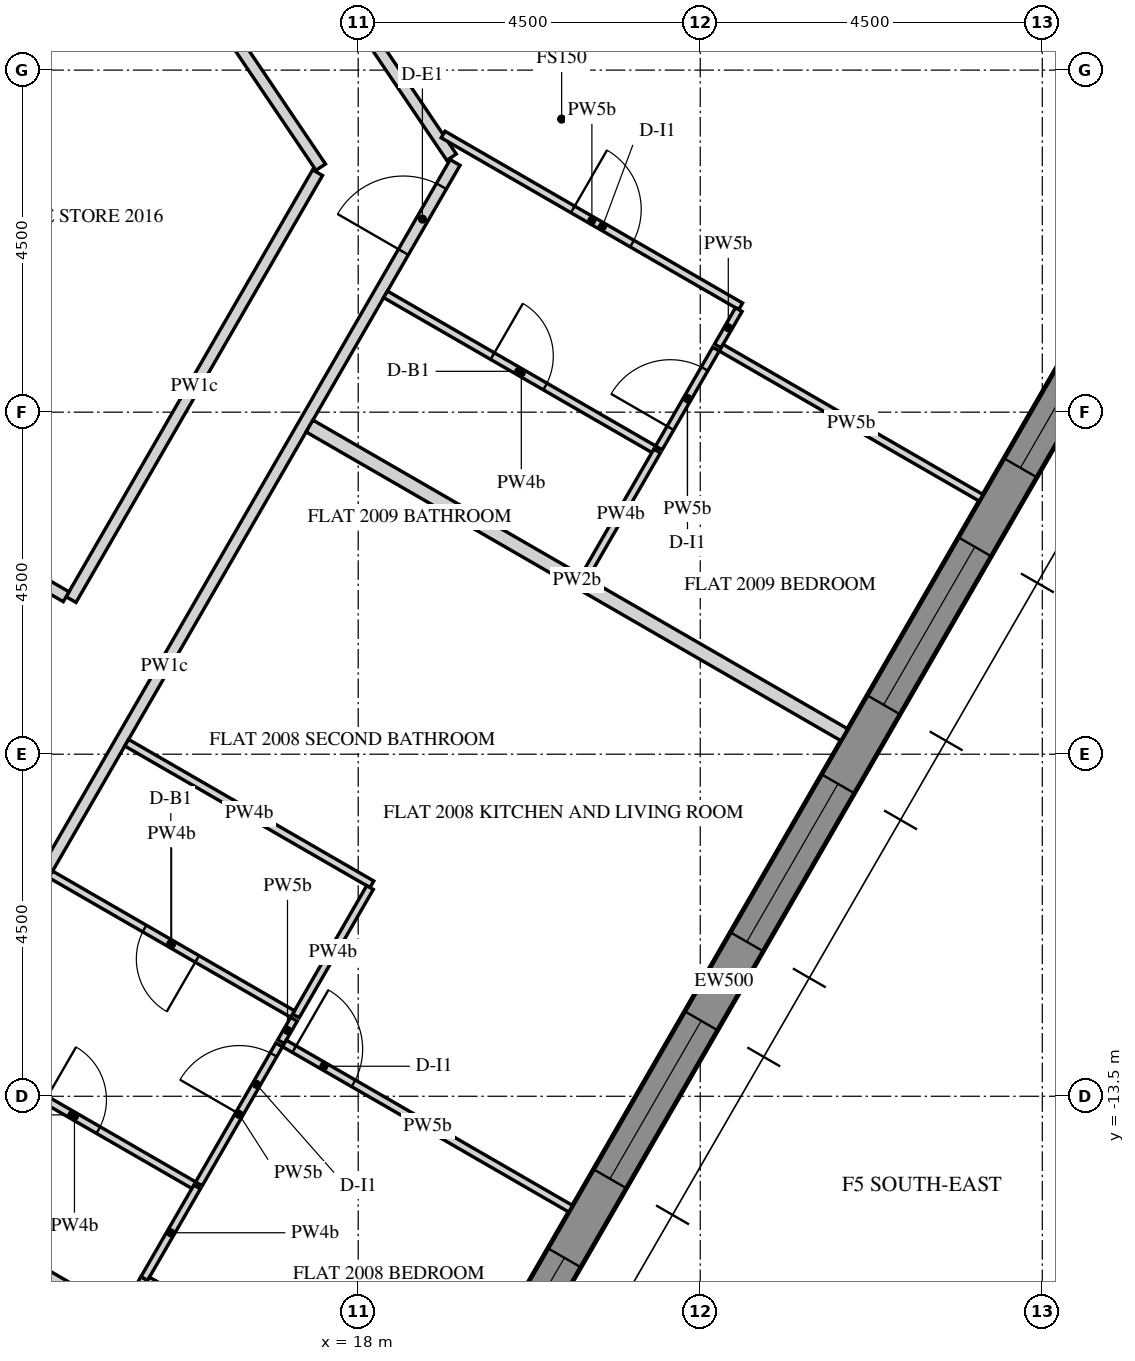
"""IFC4 building model, lengths in metres.
Left out: names, types, materials, properties, quantities, classifications, styles, units other than length and angle.
Written with IfcOpenShell. Run it as: python <this file> out.ifc"""

import sys

from ifc_helpers import new_model, si_unit, direction, frame, frame_2d, origin, place, context, subcontext, project, spatial, polyline, rectangle, outline, extrude, element, fill, save


model = new_model("IFC4")
c1 = context("Model", 3, precision=1e-05, world=origin(), true_north=direction((0.0, 1.0)))
c2 = subcontext(c1, "Body", "Model", "MODEL_VIEW")
j1 = project(units=[si_unit("LENGTHUNIT", "METRE"), si_unit("PLANEANGLEUNIT", "RADIAN")], contexts=[c1])
p1 = place(None, origin())
s1 = spatial("IfcSite", under=j1, at=p1, CompositionType="ELEMENT")
p2 = place(p1, origin())
s2 = spatial("IfcBuilding", under=s1, at=p2, CompositionType="ELEMENT")
p3 = place(p2, frame((0.0, 0.0, 260.1)))
s3 = spatial("IfcBuildingStorey", under=s2, at=p3, CompositionType="ELEMENT", Elevation=260.1)
p4 = place(p3, frame((16.451, -23.005, -0.15), z_axis=(0.0, 0.0, 1.0), x_axis=(0.500003737743, 0.866023245787, 0.0)))
e1 = element("IfcWall", 1, at=p4, inside=s3, PredefinedType="SOLIDWALL", context=c2, shape_type="SweptSolid", body=[
    extrude(outline(polyline([(-0.021, -0.25), (25.468, -0.25), (25.421, 0.25), (0.021, 0.25), (-0.021, -0.25)])), origin(), (0.0, 0.0, 1.0), 3.9),
])
p5 = place(p4, frame((2.522, 0.0, 0.75)))
e2 = element("IfcOpeningElement", 2, at=p5, cuts=e1, PredefinedType="OPENING", context=c2, shape_type="SweptSolid", body=[
    extrude(rectangle(XDim=2.4, YDim=2.7, at=frame_2d((1.2, 1.35))), frame((0.0, 0.26, 0.0), z_axis=(0.0, -1.0, 0.0), x_axis=(1.0, 0.0, 0.0)), (0.0, 0.0, 1.0), 0.52),
])
p6 = place(p4, frame((6.122, 0.0, 0.75)))
e3 = element("IfcOpeningElement", 3, at=p6, cuts=e1, PredefinedType="OPENING", context=c2, shape_type="SweptSolid", body=[
    extrude(rectangle(XDim=2.4, YDim=2.7, at=frame_2d((1.2, 1.35))), frame((0.0, 0.26, 0.0), z_axis=(0.0, -1.0, 0.0), x_axis=(1.0, 0.0, 0.0)), (0.0, 0.0, 1.0), 0.52),
])
p7 = place(p4, frame((9.722, 0.0, 0.75)))
e4 = element("IfcOpeningElement", 4, at=p7, cuts=e1, PredefinedType="OPENING", context=c2, shape_type="SweptSolid", body=[
    extrude(rectangle(XDim=2.4, YDim=2.7, at=frame_2d((1.2, 1.35))), frame((0.0, 0.26, 0.0), z_axis=(0.0, -1.0, 0.0), x_axis=(1.0, 0.0, 0.0)), (0.0, 0.0, 1.0), 0.52),
])
p8 = place(p4, frame((13.323, 0.0, 0.75)))
e5 = element("IfcOpeningElement", 5, at=p8, cuts=e1, PredefinedType="OPENING", context=c2, shape_type="SweptSolid", body=[
    extrude(rectangle(XDim=2.4, YDim=2.7, at=frame_2d((1.2, 1.35))), frame((0.0, 0.26, 0.0), z_axis=(0.0, -1.0, 0.0), x_axis=(1.0, 0.0, 0.0)), (0.0, 0.0, 1.0), 0.52),
])
p9 = place(p4, frame((16.922, 0.0, 0.75)))
e6 = element("IfcOpeningElement", 6, at=p9, cuts=e1, PredefinedType="OPENING", context=c2, shape_type="SweptSolid", body=[
    extrude(rectangle(XDim=2.4, YDim=2.7, at=frame_2d((1.2, 1.35))), frame((0.0, 0.26, 0.0), z_axis=(0.0, -1.0, 0.0), x_axis=(1.0, 0.0, 0.0)), (0.0, 0.0, 1.0), 0.52),
])
p10 = place(p4, frame((20.522, 0.0, 0.75)))
e7 = element("IfcOpeningElement", 7, at=p10, cuts=e1, PredefinedType="OPENING", context=c2, shape_type="SweptSolid", body=[
    extrude(rectangle(XDim=2.4, YDim=2.7, at=frame_2d((1.2, 1.35))), frame((0.0, 0.26, 0.0), z_axis=(0.0, -1.0, 0.0), x_axis=(1.0, 0.0, 0.0)), (0.0, 0.0, 1.0), 0.52),
])
p11 = place(p3, frame((6.351, -11.0, -0.15), z_axis=(0.0, 0.0, 1.0), x_axis=(0.499998894578, -0.866026041999, 0.0)))
e8 = element("IfcWall", 8, at=p11, inside=s3, PredefinedType="SHEAR", context=c2, shape_type="SweptSolid", body=[
    extrude(rectangle(XDim=15.544, YDim=0.4, at=frame_2d((7.772, 0.0))), origin(), (0.0, 0.0, 1.0), 3.9),
])
p12 = place(p11, frame((6.872, 0.0, 0.15)))
e9 = element("IfcOpeningElement", 9, at=p12, cuts=e8, PredefinedType="OPENING", context=c2, shape_type="SweptSolid", body=[
    extrude(rectangle(XDim=1.8, YDim=2.4, at=frame_2d((0.9, 1.2))), frame((0.0, 0.21, 0.0), z_axis=(0.0, -1.0, 0.0), x_axis=(1.0, 0.0, 0.0)), (0.0, 0.0, 1.0), 0.42),
])
p13 = place(p3, frame((11.627, -14.462, 0.0), z_axis=(0.0, 0.0, 1.0), x_axis=(0.499994634027, 0.866028501808, 0.0)))
e10 = element("IfcWall", 10, at=p13, inside=s3, PredefinedType="PARTITIONING", context=c2, shape_type="SweptSolid", body=[
    extrude(rectangle(XDim=15.296, YDim=0.15, at=frame_2d((7.648, 0.0))), origin(), (0.0, 0.0, 1.0), 2.823),
])
p14 = place(p13, frame((2.725, 0.0, 0.0)))
e11 = element("IfcOpeningElement", 11, at=p14, cuts=e10, PredefinedType="OPENING", context=c2, shape_type="SweptSolid", body=[
    extrude(rectangle(XDim=1.0, YDim=2.1, at=frame_2d((0.5, 1.05))), frame((0.0, 0.085, 0.0), z_axis=(0.0, -1.0, 0.0), x_axis=(1.0, 0.0, 0.0)), (0.0, 0.0, 1.0), 0.17),
])
p15 = place(p13, frame((13.936, 0.0, 0.0)))
e12 = element("IfcOpeningElement", 12, at=p15, cuts=e10, PredefinedType="OPENING", context=c2, shape_type="SweptSolid", body=[
    extrude(rectangle(XDim=1.0, YDim=2.1, at=frame_2d((0.5, 1.05))), frame((0.0, 0.085, 0.0), z_axis=(0.0, -1.0, 0.0), x_axis=(1.0, 0.0, 0.0)), (0.0, 0.0, 1.0), 0.17),
])
p16 = place(p3, frame((14.88, -16.427, 0.0), z_axis=(0.0, 0.0, 1.0), x_axis=(-0.86601654697, 0.500015340139, 0.0)))
e13 = element("IfcWall", 13, at=p16, inside=s3, PredefinedType="PARTITIONING", context=c2, shape_type="SweptSolid", body=[
    extrude(rectangle(XDim=3.8, YDim=0.15, at=frame_2d((1.9, 0.0))), origin(), (0.0, 0.0, 1.0), 2.823),
])
p17 = place(p3, frame((19.228, -1.146, 0.0), z_axis=(0.0, 0.0, 1.0), x_axis=(-0.559190017735, 0.829039519001, 0.0)))
e14 = element("IfcWall", 14, at=p17, inside=s3, PredefinedType="PARTITIONING", context=c2, shape_type="SweptSolid", body=[
    extrude(rectangle(XDim=17.273, YDim=0.15, at=frame_2d((8.637, 0.0))), origin(), (0.0, 0.0, 1.0), 2.823),
])
p18 = place(p17, frame((6.478, 0.0, 0.0)))
e15 = element("IfcOpeningElement", 15, at=p18, cuts=e14, PredefinedType="OPENING", context=c2, shape_type="SweptSolid", body=[
    extrude(rectangle(XDim=1.0, YDim=2.1, at=frame_2d((0.5, 1.05))), frame((0.0, 0.085, 0.0), z_axis=(0.0, -1.0, 0.0), x_axis=(1.0, 0.0, 0.0)), (0.0, 0.0, 1.0), 0.17),
])
p19 = place(p3, frame((12.627, 5.958, 0.0), z_axis=(0.0, 0.0, 1.0), x_axis=(0.559185493191, -0.829042570804, 0.0)))
e16 = element("IfcWall", 16, at=p19, inside=s3, PredefinedType="PARTITIONING", context=c2, shape_type="SweptSolid", body=[
    extrude(rectangle(XDim=8.727, YDim=0.15, at=frame_2d((4.363, 0.0))), origin(), (0.0, 0.0, 1.0), 2.823),
])
p20 = place(p19, frame((3.913, 0.0, 0.0)))
e17 = element("IfcOpeningElement", 17, at=p20, cuts=e16, PredefinedType="OPENING", context=c2, shape_type="SweptSolid", body=[
    extrude(rectangle(XDim=0.9, YDim=2.1, at=frame_2d((0.45, 1.05))), frame((0.0, 0.085, 0.0), z_axis=(0.0, -1.0, 0.0), x_axis=(1.0, 0.0, 0.0)), (0.0, 0.0, 1.0), 0.17),
])
p21 = place(p3, frame((17.465, -1.349, 0.0), z_axis=(0.0, 0.0, 1.0), x_axis=(-0.500001610943, -0.866024473704, 0.0)))
e18 = element("IfcWall", 18, at=p21, inside=s3, PredefinedType="PARTITIONING", context=c2, shape_type="SweptSolid", body=[
    extrude(rectangle(XDim=6.485, YDim=0.15, at=frame_2d((3.243, 0.0))), origin(), (0.0, 0.0, 1.0), 2.823),
])
p22 = place(p3, frame((14.158, -6.928, 0.0), z_axis=(0.0, 0.0, 1.0), x_axis=(-0.866024684746, 0.500001245408, 0.0)))
e19 = element("IfcWall", 19, at=p22, inside=s3, PredefinedType="PARTITIONING", context=c2, shape_type="SweptSolid", body=[
    extrude(rectangle(XDim=4.725, YDim=0.15, at=frame_2d((2.363, 0.0))), origin(), (0.0, 0.0, 1.0), 2.823),
])
p23 = place(p3, frame((17.155, -12.487, 0.0), z_axis=(0.0, 0.0, 1.0), x_axis=(-0.499681137129, -0.866209421097, 0.0)))
e20 = element("IfcWall", 20, at=p23, inside=s3, PredefinedType="PARTITIONING", context=c2, shape_type="SweptSolid", body=[
    extrude(rectangle(XDim=0.341, YDim=0.1, at=frame_2d((0.17, 0.0))), origin(), (0.0, 0.0, 1.0), 2.823),
])
p24 = place(p3, frame((17.029, -12.805, 0.0), z_axis=(0.0, 0.0, 1.0), x_axis=(0.866027639635, -0.499996127374, 0.0)))
e21 = element("IfcWall", 21, at=p24, inside=s3, PredefinedType="PARTITIONING", context=c2, shape_type="SweptSolid", body=[
    extrude(rectangle(XDim=4.35, YDim=0.1, at=frame_2d((2.175, 0.0))), origin(), (0.0, 0.0, 1.0), 2.823),
])
p25 = place(p24, frame((0.15, 0.0, 0.0)))
e22 = element("IfcOpeningElement", 22, at=p25, cuts=e21, PredefinedType="OPENING", context=c2, shape_type="SweptSolid", body=[
    extrude(rectangle(XDim=0.9, YDim=2.1, at=frame_2d((0.45, 1.05))), frame((0.0, 0.06, 0.0), z_axis=(0.0, -1.0, 0.0), x_axis=(1.0, 0.0, 0.0)), (0.0, 0.0, 1.0), 0.12),
])
p26 = place(p3, frame((14.954, -8.849, 0.0), z_axis=(0.0, 0.0, 1.0), x_axis=(0.866028424924, -0.499994767197, 0.0)))
e23 = element("IfcWall", 23, at=p26, inside=s3, PredefinedType="PARTITIONING", context=c2, shape_type="SweptSolid", body=[
    extrude(rectangle(XDim=3.725, YDim=0.1, at=frame_2d((1.863, 0.0))), origin(), (0.0, 0.0, 1.0), 2.823),
])
p27 = place(p3, frame((18.155, -10.754, 0.0), z_axis=(0.0, 0.0, 1.0), x_axis=(-0.49989585183, -0.866085525409, 0.0)))
e24 = element("IfcWall", 24, at=p27, inside=s3, PredefinedType="PARTITIONING", context=c2, shape_type="SweptSolid", body=[
    extrude(rectangle(XDim=1.95, YDim=0.1, at=frame_2d((0.975, 0.0))), origin(), (0.0, 0.0, 1.0), 2.823),
])
p28 = place(p3, frame((24.396, -8.745, 0.0), z_axis=(0.0, 0.0, 1.0), x_axis=(-0.866022959057, 0.500004234368, 0.0)))
e25 = element("IfcWall", 25, at=p28, inside=s3, PredefinedType="PARTITIONING", context=c2, shape_type="SweptSolid", body=[
    extrude(rectangle(XDim=8.125, YDim=0.18, at=frame_2d((4.062, 0.0))), origin(), (0.0, 0.0, 1.0), 2.823),
])
p29 = place(p3, frame((12.654, -12.833, 0.0), z_axis=(0.0, 0.0, 1.0), x_axis=(0.866056803351, -0.499945610411, 0.0)))
e26 = element("IfcWall", 26, at=p29, inside=s3, PredefinedType="PARTITIONING", context=c2, shape_type="SweptSolid", body=[
    extrude(rectangle(XDim=3.725, YDim=0.1, at=frame_2d((1.863, 0.0))), origin(), (0.0, 0.0, 1.0), 2.823),
])
p30 = place(p29, frame((1.425, 0.0, 0.0)))
e27 = element("IfcOpeningElement", 27, at=p30, cuts=e26, PredefinedType="OPENING", context=c2, shape_type="SweptSolid", body=[
    extrude(rectangle(XDim=0.8, YDim=2.1, at=frame_2d((0.4, 1.05))), frame((0.0, 0.06, 0.0), z_axis=(0.0, -1.0, 0.0), x_axis=(1.0, 0.0, 0.0)), (0.0, 0.0, 1.0), 0.12),
])
p31 = place(p3, frame((15.904, -14.653, 0.0), z_axis=(0.0, 0.0, 1.0), x_axis=(0.499979177903, 0.866037425094, 0.0)))
e28 = element("IfcWall", 28, at=p31, inside=s3, PredefinedType="PARTITIONING", context=c2, shape_type="SweptSolid", body=[
    extrude(rectangle(XDim=2.113, YDim=0.1, at=frame_2d((1.056, 0.0))), origin(), (0.0, 0.0, 1.0), 2.823),
])
p32 = place(p31, frame((1.063, 0.0, 0.0)))
e29 = element("IfcOpeningElement", 29, at=p32, cuts=e28, PredefinedType="OPENING", context=c2, shape_type="SweptSolid", body=[
    extrude(rectangle(XDim=0.9, YDim=2.1, at=frame_2d((0.45, 1.05))), frame((0.0, 0.06, 0.0), z_axis=(0.0, -1.0, 0.0), x_axis=(1.0, 0.0, 0.0)), (0.0, 0.0, 1.0), 0.12),
])
p33 = place(p3, frame((17.137, -12.418, 0.0), z_axis=(0.0, 0.0, 1.0), x_axis=(-0.866035129944, 0.499983153418, 0.0)))
e30 = element("IfcWall", 30, at=p33, inside=s3, PredefinedType="PARTITIONING", context=c2, shape_type="SweptSolid", body=[
    extrude(rectangle(XDim=3.675, YDim=0.1, at=frame_2d((1.837, 0.0))), origin(), (0.0, 0.0, 1.0), 2.823),
])
p34 = place(p33, frame((1.45, 0.0, 0.0)))
e31 = element("IfcOpeningElement", 31, at=p34, cuts=e30, PredefinedType="OPENING", context=c2, shape_type="SweptSolid", body=[
    extrude(rectangle(XDim=0.8, YDim=2.1, at=frame_2d((0.4, 1.05))), frame((0.0, 0.06, 0.0), z_axis=(0.0, -1.0, 0.0), x_axis=(1.0, 0.0, 0.0)), (0.0, 0.0, 1.0), 0.12),
])
p35 = place(p3, frame((14.917, -16.364, 0.0), z_axis=(0.0, 0.0, 1.0), x_axis=(0.500141487433, 0.865943700565, 0.0)))
e32 = element("IfcWall", 32, at=p35, inside=s3, PredefinedType="PARTITIONING", context=c2, shape_type="SweptSolid", body=[
    extrude(rectangle(XDim=0.538, YDim=0.1, at=frame_2d((0.269, 0.0))), origin(), (0.0, 0.0, 1.0), 2.823),
])
p36 = place(p3, frame((15.186, -15.898, 0.0), z_axis=(0.0, 0.0, 1.0), x_axis=(0.4999705729, 0.866042392862, 0.0)))
e33 = element("IfcWall", 33, at=p36, inside=s3, PredefinedType="PARTITIONING", context=c2, shape_type="SweptSolid", body=[
    extrude(rectangle(XDim=1.391, YDim=0.1, at=frame_2d((0.696, 0.0))), origin(), (0.0, 0.0, 1.0), 2.823),
])
p37 = place(p3, frame((18.996, -18.098, 0.0), z_axis=(0.0, 0.0, 1.0), x_axis=(-0.866027639635, 0.499996127374, 0.0)))
e34 = element("IfcWall", 34, at=p37, inside=s3, PredefinedType="PARTITIONING", context=c2, shape_type="SweptSolid", body=[
    extrude(rectangle(XDim=4.35, YDim=0.1, at=frame_2d((2.175, 0.0))), origin(), (0.0, 0.0, 1.0), 2.823),
])
p38 = place(p37, frame((3.3, 0.0, 0.0)))
e35 = element("IfcOpeningElement", 35, at=p38, cuts=e34, PredefinedType="OPENING", context=c2, shape_type="SweptSolid", body=[
    extrude(rectangle(XDim=0.9, YDim=2.1, at=frame_2d((0.45, 1.05))), frame((0.0, 0.06, 0.0), z_axis=(0.0, -1.0, 0.0), x_axis=(1.0, 0.0, 0.0)), (0.0, 0.0, 1.0), 0.12),
])
p39 = place(p3, frame((19.117, -0.847, 0.0), z_axis=(0.0, 0.0, 1.0), x_axis=(0.866020997002, -0.500007632694, 0.0)))
e36 = element("IfcWall", 36, at=p39, inside=s3, PredefinedType="PARTITIONING", context=c2, shape_type="SweptSolid", body=[
    extrude(rectangle(XDim=4.521, YDim=0.1, at=frame_2d((2.26, 0.0))), origin(), (0.0, 0.0, 1.0), 2.823),
])
p40 = place(p39, frame((1.97, 0.0, 0.0)))
e37 = element("IfcOpeningElement", 37, at=p40, cuts=e36, PredefinedType="OPENING", context=c2, shape_type="SweptSolid", body=[
    extrude(rectangle(XDim=0.9, YDim=2.1, at=frame_2d((0.45, 1.05))), frame((0.0, 0.06, 0.0), z_axis=(0.0, -1.0, 0.0), x_axis=(1.0, 0.0, 0.0)), (0.0, 0.0, 1.0), 0.12),
])
p41 = place(p3, frame((23.007, -3.151, 0.0), z_axis=(0.0, 0.0, 1.0), x_axis=(-0.499850094852, -0.866111934265, 0.0)))
e38 = element("IfcWall", 38, at=p41, inside=s3, PredefinedType="PARTITIONING", context=c2, shape_type="SweptSolid", body=[
    extrude(rectangle(XDim=0.552, YDim=0.1, at=frame_2d((0.276, 0.0))), origin(), (0.0, 0.0, 1.0), 2.823),
])
p42 = place(p3, frame((22.775, -3.652, 0.0), z_axis=(0.0, 0.0, 1.0), x_axis=(0.866020906874, -0.500007788796, 0.0)))
e39 = element("IfcWall", 39, at=p42, inside=s3, PredefinedType="PARTITIONING", context=c2, shape_type="SweptSolid", body=[
    extrude(rectangle(XDim=3.95, YDim=0.1, at=frame_2d((1.975, 0.0))), origin(), (0.0, 0.0, 1.0), 2.823),
])
p43 = place(p3, frame((18.36, -2.95, 0.0), z_axis=(0.0, 0.0, 1.0), x_axis=(0.866019999656, -0.500009360108, 0.0)))
e40 = element("IfcWall", 40, at=p43, inside=s3, PredefinedType="PARTITIONING", context=c2, shape_type="SweptSolid", body=[
    extrude(rectangle(XDim=4.125, YDim=0.1, at=frame_2d((2.062, 0.0))), origin(), (0.0, 0.0, 1.0), 2.823),
])
p44 = place(p43, frame((1.625, 0.0, 0.0)))
e41 = element("IfcOpeningElement", 41, at=p44, cuts=e40, PredefinedType="OPENING", context=c2, shape_type="SweptSolid", body=[
    extrude(rectangle(XDim=0.8, YDim=2.1, at=frame_2d((0.4, 1.05))), frame((0.0, 0.06, 0.0), z_axis=(0.0, -1.0, 0.0), x_axis=(1.0, 0.0, 0.0)), (0.0, 0.0, 1.0), 0.12),
])
p45 = place(p3, frame((21.956, -4.971, 0.0), z_axis=(0.0, 0.0, 1.0), x_axis=(0.499985098601, 0.86603400694, 0.0)))
e42 = element("IfcWall", 42, at=p45, inside=s3, PredefinedType="PARTITIONING", context=c2, shape_type="SweptSolid", body=[
    extrude(rectangle(XDim=1.502, YDim=0.1, at=frame_2d((0.751, 0.0))), origin(), (0.0, 0.0, 1.0), 2.823),
])
p46 = place(p45, frame((0.302, 0.0, 0.0)))
e43 = element("IfcOpeningElement", 43, at=p46, cuts=e42, PredefinedType="OPENING", context=c2, shape_type="SweptSolid", body=[
    extrude(rectangle(XDim=0.9, YDim=2.1, at=frame_2d((0.45, 1.05))), frame((0.0, 0.06, 0.0), z_axis=(0.0, -1.0, 0.0), x_axis=(1.0, 0.0, 0.0)), (0.0, 0.0, 1.0), 0.12),
])
p47 = place(p3, frame((20.977, -6.667, 0.0), z_axis=(0.0, 0.0, 1.0), x_axis=(0.49994353734, 0.866058000062, 0.0)))
e44 = element("IfcWall", 44, at=p47, inside=s3, PredefinedType="PARTITIONING", context=c2, shape_type="SweptSolid", body=[
    extrude(rectangle(XDim=1.912, YDim=0.1, at=frame_2d((0.956, 0.0))), origin(), (0.0, 0.0, 1.0), 2.823),
])
p48 = place(p6, frame((0.0, 0.18, 0.0)))
e45 = element("IfcWindow", 45, at=p48, inside=s3, PartitioningType="DOUBLE_PANEL_VERTICAL", PredefinedType="WINDOW", context=c2, shape_type="SweptSolid", body=[
    extrude(rectangle(XDim=2.4, YDim=2.7, at=frame_2d((1.2, 1.35))), frame((0.0, 0.03, 0.0), z_axis=(0.0, -1.0, 0.0), x_axis=(1.0, 0.0, 0.0)), (0.0, 0.0, 1.0), 0.06),
])
fill(e3, e45)
p49 = place(p7, frame((0.0, 0.18, 0.0)))
e46 = element("IfcWindow", 46, at=p49, inside=s3, PartitioningType="DOUBLE_PANEL_VERTICAL", PredefinedType="WINDOW", context=c2, shape_type="SweptSolid", body=[
    extrude(rectangle(XDim=2.4, YDim=2.7, at=frame_2d((1.2, 1.35))), frame((0.0, 0.03, 0.0), z_axis=(0.0, -1.0, 0.0), x_axis=(1.0, 0.0, 0.0)), (0.0, 0.0, 1.0), 0.06),
])
fill(e4, e46)
p50 = place(p8, frame((0.0, 0.18, 0.0)))
e47 = element("IfcWindow", 47, at=p50, inside=s3, PartitioningType="DOUBLE_PANEL_VERTICAL", PredefinedType="WINDOW", context=c2, shape_type="SweptSolid", body=[
    extrude(rectangle(XDim=2.4, YDim=2.7, at=frame_2d((1.2, 1.35))), frame((0.0, 0.03, 0.0), z_axis=(0.0, -1.0, 0.0), x_axis=(1.0, 0.0, 0.0)), (0.0, 0.0, 1.0), 0.06),
])
fill(e5, e47)
p51 = place(p9, frame((0.0, 0.18, 0.0)))
e48 = element("IfcWindow", 48, at=p51, inside=s3, PartitioningType="DOUBLE_PANEL_VERTICAL", PredefinedType="WINDOW", context=c2, shape_type="SweptSolid", body=[
    extrude(rectangle(XDim=2.4, YDim=2.7, at=frame_2d((1.2, 1.35))), frame((0.0, 0.03, 0.0), z_axis=(0.0, -1.0, 0.0), x_axis=(1.0, 0.0, 0.0)), (0.0, 0.0, 1.0), 0.06),
])
fill(e6, e48)
p52 = place(p10, frame((0.0, 0.18, 0.0)))
e49 = element("IfcWindow", 49, at=p52, inside=s3, PartitioningType="DOUBLE_PANEL_VERTICAL", PredefinedType="WINDOW", context=c2, shape_type="SweptSolid", body=[
    extrude(rectangle(XDim=2.4, YDim=2.7, at=frame_2d((1.2, 1.35))), frame((0.0, 0.03, 0.0), z_axis=(0.0, -1.0, 0.0), x_axis=(1.0, 0.0, 0.0)), (0.0, 0.0, 1.0), 0.06),
])
fill(e7, e49)
p53 = place(p30, origin())
e50 = element("IfcDoor", 50, at=p53, inside=s3, OperationType="SINGLE_SWING_RIGHT", PredefinedType="DOOR", context=c2, shape_type="SweptSolid", body=[
    extrude(rectangle(XDim=0.8, YDim=2.1, at=frame_2d((0.4, 1.05))), frame((0.0, 0.025, 0.0), z_axis=(0.0, -1.0, 0.0), x_axis=(1.0, 0.0, 0.0)), (0.0, 0.0, 1.0), 0.05),
])
fill(e27, e50)
p54 = place(p32, origin())
e51 = element("IfcDoor", 51, at=p54, inside=s3, OperationType="SINGLE_SWING_RIGHT", PredefinedType="DOOR", context=c2, shape_type="SweptSolid", body=[
    extrude(rectangle(XDim=0.9, YDim=2.1, at=frame_2d((0.45, 1.05))), frame((0.0, 0.025, 0.0), z_axis=(0.0, -1.0, 0.0), x_axis=(1.0, 0.0, 0.0)), (0.0, 0.0, 1.0), 0.05),
])
fill(e29, e51)
p55 = place(p25, origin())
e52 = element("IfcDoor", 52, at=p55, inside=s3, OperationType="SINGLE_SWING_RIGHT", PredefinedType="DOOR", context=c2, shape_type="SweptSolid", body=[
    extrude(rectangle(XDim=0.9, YDim=2.1, at=frame_2d((0.45, 1.05))), frame((0.0, 0.025, 0.0), z_axis=(0.0, -1.0, 0.0), x_axis=(1.0, 0.0, 0.0)), (0.0, 0.0, 1.0), 0.05),
])
fill(e22, e52)
p56 = place(p34, origin())
e53 = element("IfcDoor", 53, at=p56, inside=s3, OperationType="SINGLE_SWING_RIGHT", PredefinedType="DOOR", context=c2, shape_type="SweptSolid", body=[
    extrude(rectangle(XDim=0.8, YDim=2.1, at=frame_2d((0.4, 1.05))), frame((0.0, 0.025, 0.0), z_axis=(0.0, -1.0, 0.0), x_axis=(1.0, 0.0, 0.0)), (0.0, 0.0, 1.0), 0.05),
])
fill(e31, e53)
p57 = place(p15, origin())
e54 = element("IfcDoor", 54, at=p57, inside=s3, OperationType="SINGLE_SWING_LEFT", PredefinedType="DOOR", context=c2, shape_type="SweptSolid", body=[
    extrude(rectangle(XDim=1.0, YDim=2.1, at=frame_2d((0.5, 1.05))), frame((0.0, 0.025, 0.0), z_axis=(0.0, -1.0, 0.0), x_axis=(1.0, 0.0, 0.0)), (0.0, 0.0, 1.0), 0.05),
])
fill(e12, e54)
p58 = place(p44, origin())
e55 = element("IfcDoor", 55, at=p58, inside=s3, OperationType="SINGLE_SWING_RIGHT", PredefinedType="DOOR", context=c2, shape_type="SweptSolid", body=[
    extrude(rectangle(XDim=0.8, YDim=2.1, at=frame_2d((0.4, 1.05))), frame((0.0, 0.025, 0.0), z_axis=(0.0, -1.0, 0.0), x_axis=(1.0, 0.0, 0.0)), (0.0, 0.0, 1.0), 0.05),
])
fill(e41, e55)
p59 = place(p40, origin())
e56 = element("IfcDoor", 56, at=p59, inside=s3, OperationType="SINGLE_SWING_LEFT", PredefinedType="DOOR", context=c2, shape_type="SweptSolid", body=[
    extrude(rectangle(XDim=0.9, YDim=2.1, at=frame_2d((0.45, 1.05))), frame((0.0, 0.025, 0.0), z_axis=(0.0, -1.0, 0.0), x_axis=(1.0, 0.0, 0.0)), (0.0, 0.0, 1.0), 0.05),
])
fill(e37, e56)
p60 = place(p46, origin())
e57 = element("IfcDoor", 57, at=p60, inside=s3, OperationType="SINGLE_SWING_RIGHT", PredefinedType="DOOR", context=c2, shape_type="SweptSolid", body=[
    extrude(rectangle(XDim=0.9, YDim=2.1, at=frame_2d((0.45, 1.05))), frame((0.0, 0.025, 0.0), z_axis=(0.0, -1.0, 0.0), x_axis=(1.0, 0.0, 0.0)), (0.0, 0.0, 1.0), 0.05),
])
fill(e43, e57)
save(model, sys.argv[1])
